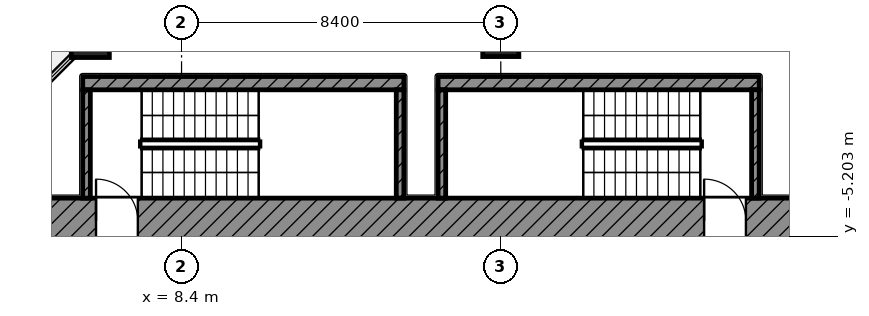
"""IFC4 building model, lengths in metres.
Left out: names, types, materials, properties, quantities, classifications, styles, units other than length and angle.
Written with IfcOpenShell. Run it as: python <this file> out.ifc"""

import sys

from ifc_helpers import new_model, si_unit, direction, frame, frame_2d, origin, origin_2d, place, context, subcontext, project, spatial, rectangle, extrude, element, fill, save


model = new_model("IFC4")
c1 = context("Model", 3, precision=1e-05, world=origin(), true_north=direction((0.0, 1.0)))
c2 = subcontext(c1, "Body", "Model", "MODEL_VIEW")
j1 = project(units=[si_unit("LENGTHUNIT", "METRE"), si_unit("PLANEANGLEUNIT", "RADIAN")], contexts=[c1])
p1 = place(None, origin())
s1 = spatial("IfcSite", under=j1, at=p1, CompositionType="ELEMENT")
p2 = place(p1, origin())
s2 = spatial("IfcBuilding", under=s1, at=p2, CompositionType="ELEMENT")
p3 = place(p2, frame((0.0, 0.0, 175.2)))
s3 = spatial("IfcBuildingStorey", under=s2, at=p3, CompositionType="ELEMENT", Elevation=175.2)
p4 = place(p3, frame((6.0, 0.0, 0.0), z_axis=(0.0, 0.0, 1.0), x_axis=(1.0, 0.0, 0.0)))
e1 = element("IfcColumn", 1, at=p4, inside=s3, PredefinedType="COLUMN", context=c2, shape_type="SweptSolid", body=[
    extrude(rectangle(XDim=1.0, YDim=1.0, at=origin_2d()), origin(), (0.0, 0.0, 1.0), 4.2),
])
p5 = place(p3, frame((16.8, 0.0, 0.0), z_axis=(0.0, 0.0, 1.0), x_axis=(1.0, 0.0, 0.0)))
e2 = element("IfcColumn", 2, at=p5, inside=s3, PredefinedType="COLUMN", context=c2, shape_type="SweptSolid", body=[
    extrude(rectangle(XDim=0.95, YDim=0.95, at=origin_2d()), origin(), (0.0, 0.0, 1.0), 4.2),
])
p6 = place(p3, frame((4.2, -4.8, 0.0), z_axis=(0.0, 0.0, 1.0), x_axis=(1.0, 0.0, 0.0)))
e3 = element("IfcWall", 3, at=p6, inside=s3, PredefinedType="SHEAR", context=c2, shape_type="SweptSolid", body=[
    extrude(rectangle(XDim=20.7, YDim=1.2, at=frame_2d((10.35, 0.0))), origin(), (0.0, 0.0, 1.0), 3.6),
])
p7 = place(p6, frame((1.95, 0.0, 0.0)))
e4 = element("IfcOpeningElement", 4, at=p7, cuts=e3, PredefinedType="OPENING", context=c2, shape_type="SweptSolid", body=[
    extrude(rectangle(XDim=1.1, YDim=2.1, at=frame_2d((0.55, 1.05))), frame((0.0, 0.61, 0.0), z_axis=(0.0, -1.0, 0.0), x_axis=(1.0, 0.0, 0.0)), (0.0, 0.0, 1.0), 1.22),
])
p8 = place(p6, frame((17.95, 0.0, 0.0)))
e5 = element("IfcOpeningElement", 5, at=p8, cuts=e3, PredefinedType="OPENING", context=c2, shape_type="SweptSolid", body=[
    extrude(rectangle(XDim=1.1, YDim=2.1, at=frame_2d((0.55, 1.05))), frame((0.0, 0.61, 0.0), z_axis=(0.0, -1.0, 0.0), x_axis=(1.0, 0.0, 0.0)), (0.0, 0.0, 1.0), 1.22),
])
p9 = place(p3, frame((5.8, -1.175, 0.0), z_axis=(0.0, 0.0, 1.0), x_axis=(1.0, 0.0, 0.0)))
e6 = element("IfcWall", 6, at=p9, inside=s3, PredefinedType="SHEAR", context=c2, shape_type="SweptSolid", body=[
    extrude(rectangle(XDim=8.45, YDim=0.35, at=frame_2d((4.225, 0.0))), origin(), (0.0, 0.0, 1.0), 3.6),
])
for number, where, z_axis, x_axis in (
    (7, (5.9, -4.2, 0.0), (0.0, 0.0, 1.0), (0.0, 1.0, 0.0)),
    (8, (14.15, -4.2, 0.0), (0.0, 0.0, 1.0), (0.0, 1.0, 0.0)),
):
    element("IfcWall", number, at=place(p3, frame(where, z_axis=z_axis, x_axis=x_axis)), inside=s3, PredefinedType="SHEAR", context=c2, shape_type="SweptSolid", body=[
        extrude(rectangle(XDim=2.85, YDim=0.2, at=frame_2d((1.425, 0.0))), origin(), (0.0, 0.0, 1.0), 3.6),
    ])
p10 = place(p3, frame((15.15, -1.175, 0.0), z_axis=(0.0, 0.0, 1.0), x_axis=(1.0, 0.0, 0.0)))
e9 = element("IfcWall", 9, at=p10, inside=s3, PredefinedType="SHEAR", context=c2, shape_type="SweptSolid", body=[
    extrude(rectangle(XDim=8.45, YDim=0.35, at=frame_2d((4.225, 0.0))), origin(), (0.0, 0.0, 1.0), 3.6),
])
for number, where, z_axis, x_axis in (
    (10, (15.25, -4.2, 0.0), (0.0, 0.0, 1.0), (0.0, 1.0, 0.0)),
    (11, (23.5, -4.2, 0.0), (0.0, 0.0, 1.0), (0.0, 1.0, 0.0)),
):
    element("IfcWall", number, at=place(p3, frame(where, z_axis=z_axis, x_axis=x_axis)), inside=s3, PredefinedType="SHEAR", context=c2, shape_type="SweptSolid", body=[
        extrude(rectangle(XDim=2.85, YDim=0.2, at=frame_2d((1.425, 0.0))), origin(), (0.0, 0.0, 1.0), 3.6),
    ])
p11 = place(p7, origin())
e12 = element("IfcDoor", 12, at=p11, inside=s3, OperationType="SINGLE_SWING_LEFT", PredefinedType="DOOR", context=c2, shape_type="SweptSolid", body=[
    extrude(rectangle(XDim=1.1, YDim=2.1, at=frame_2d((0.55, 1.05))), frame((0.0, 0.025, 0.0), z_axis=(0.0, -1.0, 0.0), x_axis=(1.0, 0.0, 0.0)), (0.0, 0.0, 1.0), 0.05),
])
fill(e4, e12)
p12 = place(p8, origin())
e13 = element("IfcDoor", 13, at=p12, inside=s3, OperationType="SINGLE_SWING_LEFT", PredefinedType="DOOR", context=c2, shape_type="SweptSolid", body=[
    extrude(rectangle(XDim=1.1, YDim=2.1, at=frame_2d((0.55, 1.05))), frame((0.0, 0.025, 0.0), z_axis=(0.0, -1.0, 0.0), x_axis=(1.0, 0.0, 0.0)), (0.0, 0.0, 1.0), 0.05),
])
fill(e5, e13)
save(model, sys.argv[1])
